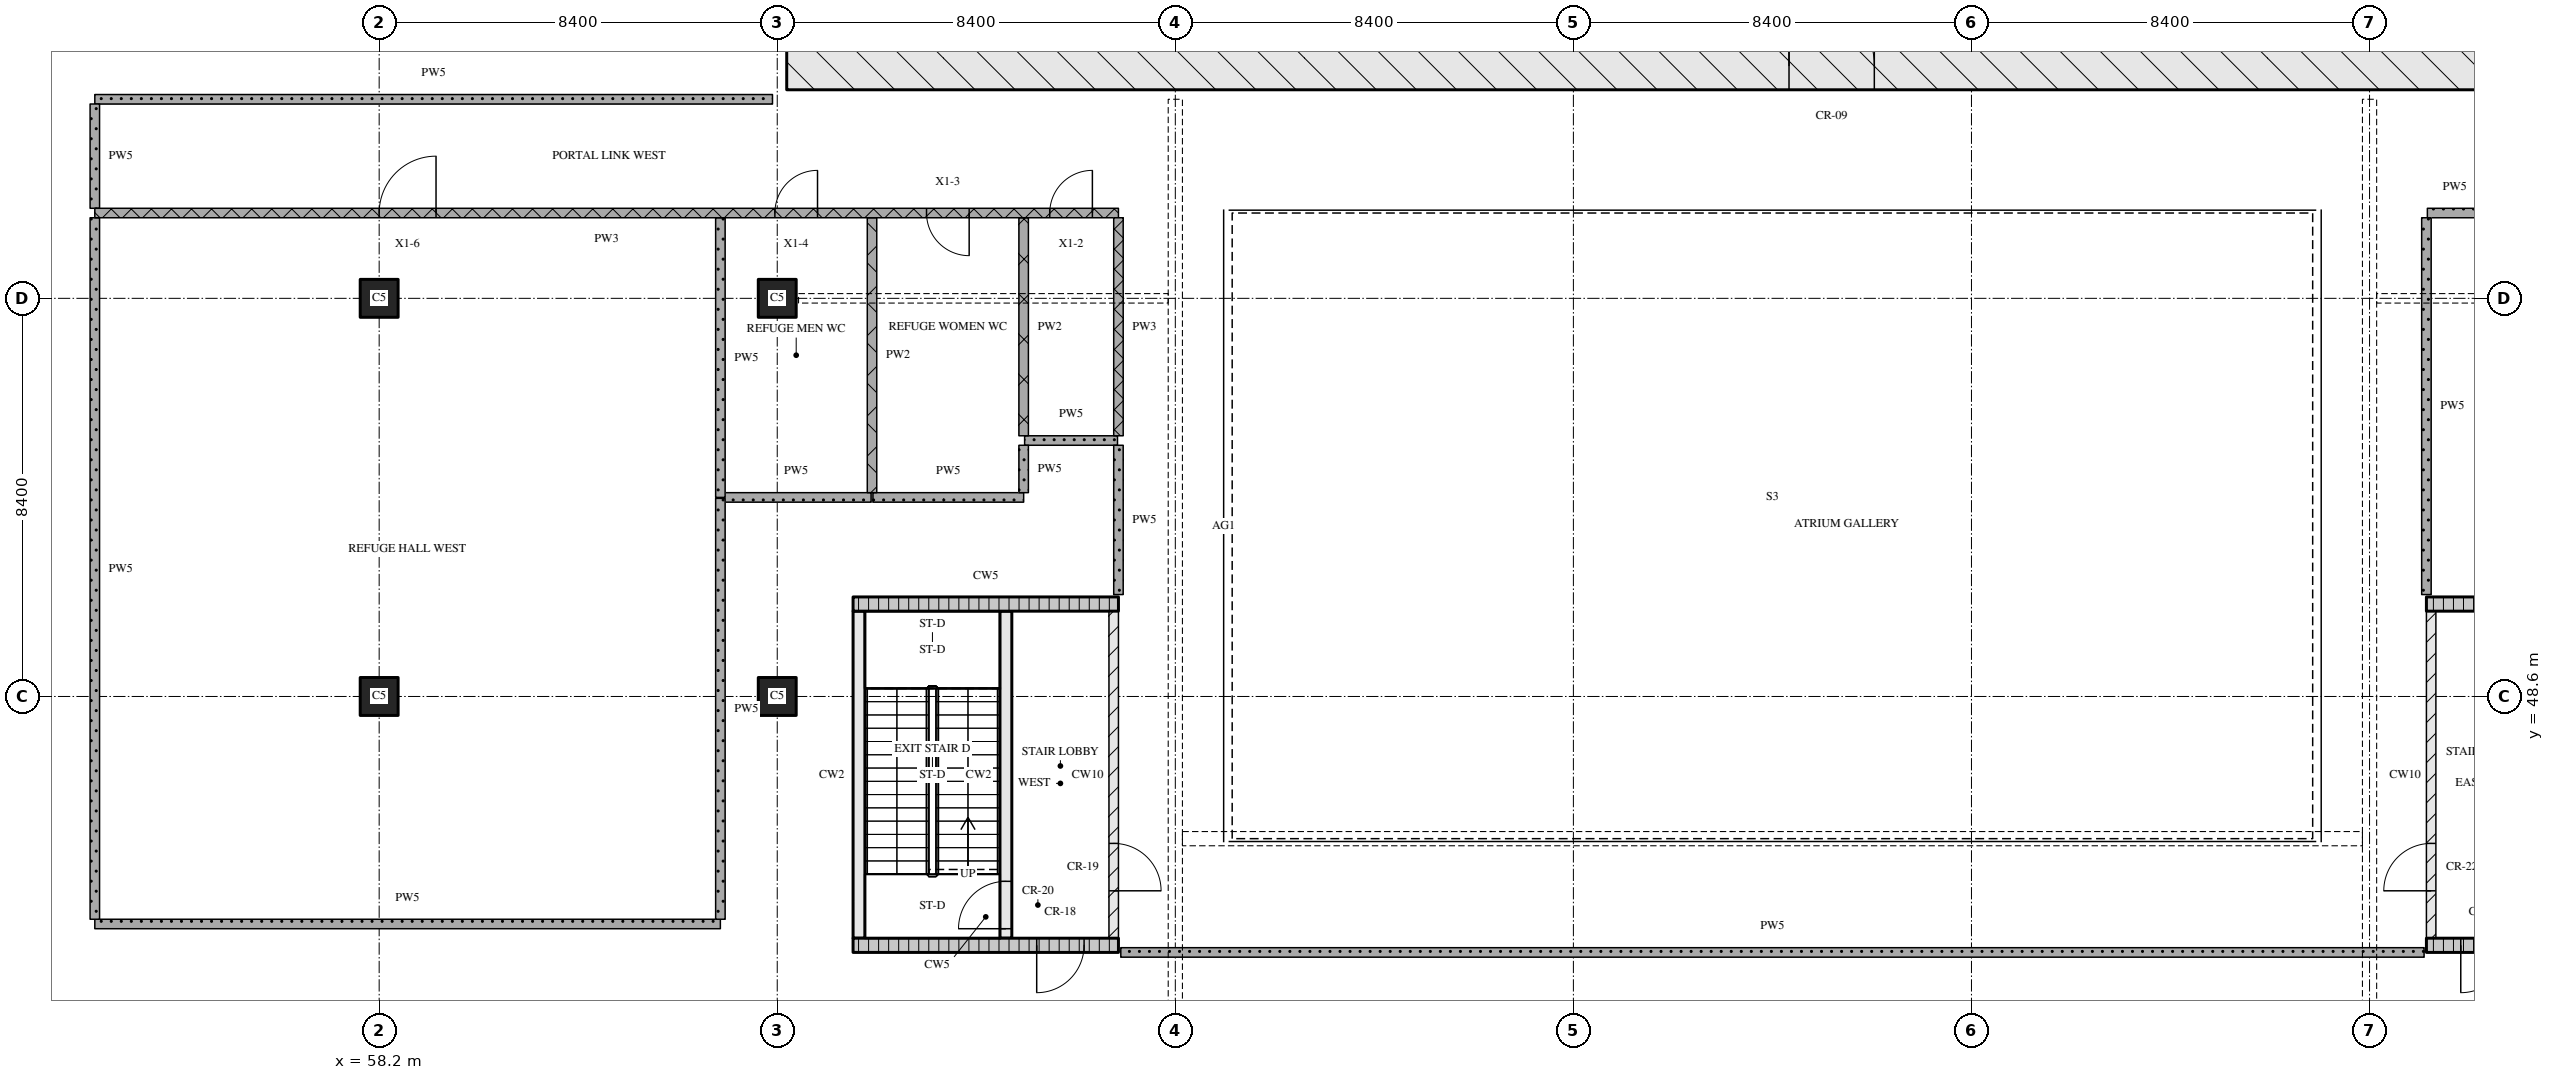
"""IFC4 building model, lengths in metres.
Left out: names, types, materials, properties, quantities, classifications, styles, units other than length and angle.
Written with IfcOpenShell. Run it as: python <this file> out.ifc"""

import sys

from ifc_helpers import new_model, si_unit, direction, frame, frame_2d, origin, origin_2d, place, context, subcontext, project, spatial, rectangle, extrude, element, fill, save


model = new_model("IFC4")
c1 = context("Model", 3, precision=1e-05, world=origin(), true_north=direction((0.0, 1.0)))
c2 = subcontext(c1, "Body", "Model", "MODEL_VIEW")
j1 = project(units=[si_unit("LENGTHUNIT", "METRE"), si_unit("PLANEANGLEUNIT", "RADIAN")], contexts=[c1])
p1 = place(None, origin())
s1 = spatial("IfcSite", under=j1, at=p1, CompositionType="ELEMENT")
p2 = place(p1, origin())
s2 = spatial("IfcBuilding", under=s1, at=p2, CompositionType="ELEMENT")
p3 = place(p2, frame((0.0, 0.0, 84.0)))
s3 = spatial("IfcBuildingStorey", under=s2, at=p3, CompositionType="ELEMENT", Elevation=84.0)
for number, where, z_axis, x_axis in (
    (1, (58.2, 48.6, 0.0), (0.0, 0.0, 1.0), (1.0, 0.0, 0.0)),
    (2, (58.2, 57.0, 0.0), (0.0, 0.0, 1.0), (1.0, 0.0, 0.0)),
    (3, (66.6, 48.6, 0.0), (0.0, 0.0, 1.0), (1.0, 0.0, 0.0)),
    (4, (66.6, 57.0, 0.0), (0.0, 0.0, 1.0), (1.0, 0.0, 0.0)),
):
    element("IfcColumn", number, at=place(p3, frame(where, z_axis=z_axis, x_axis=x_axis)), inside=s3, PredefinedType="COLUMN", context=c2, shape_type="SweptSolid", body=[
        extrude(rectangle(XDim=0.8, YDim=0.8, at=origin_2d()), origin(), (0.0, 0.0, 1.0), 11.25),
    ])
p4 = place(p3, frame((66.8, 61.9, 0.0), z_axis=(0.0, 0.0, 1.0), x_axis=(1.0, 0.0, 0.0)))
e5 = element("IfcWall", 5, at=p4, inside=s3, PredefinedType="SOLIDWALL", context=c2, shape_type="SweptSolid", body=[
    extrude(rectangle(XDim=41.6, YDim=1.0, at=frame_2d((20.8, 0.0))), origin(), (0.0, 0.0, 1.0), 10.97),
])
p5 = place(p4, frame((21.15, 0.0, 0.0)))
e6 = element("IfcOpeningElement", 6, at=p5, cuts=e5, PredefinedType="OPENING", context=c2, shape_type="SweptSolid", body=[
    extrude(rectangle(XDim=1.8, YDim=2.1, at=frame_2d((0.9, 1.05))), frame((0.0, 0.51, 0.0), z_axis=(0.0, -1.0, 0.0), x_axis=(1.0, 0.0, 0.0)), (0.0, 0.0, 1.0), 1.02),
])
p6 = place(p3, frame((68.2, 43.35, 0.0), z_axis=(0.0, 0.0, 1.0), x_axis=(1.0, 0.0, 0.0)))
e7 = element("IfcWall", 7, at=p6, inside=s3, PredefinedType="SOLIDWALL", context=c2, shape_type="SweptSolid", body=[
    extrude(rectangle(XDim=5.6, YDim=0.3, at=frame_2d((2.8, 0.0))), origin(), (0.0, 0.0, 1.0), 10.97),
])
p7 = place(p6, frame((3.875, 0.0, 0.0)))
e8 = element("IfcOpeningElement", 8, at=p7, cuts=e7, PredefinedType="OPENING", context=c2, shape_type="SweptSolid", body=[
    extrude(rectangle(XDim=1.0, YDim=2.1, at=frame_2d((0.5, 1.05))), frame((0.0, 0.16, 0.0), z_axis=(0.0, -1.0, 0.0), x_axis=(1.0, 0.0, 0.0)), (0.0, 0.0, 1.0), 0.32),
])
p8 = place(p3, frame((68.325, 43.5, 0.0), z_axis=(0.0, 0.0, 1.0), x_axis=(0.0, 1.0, 0.0)))
e9 = element("IfcWall", 9, at=p8, inside=s3, PredefinedType="SOLIDWALL", context=c2, shape_type="SweptSolid", body=[
    extrude(rectangle(XDim=6.9, YDim=0.25, at=frame_2d((3.45, 0.0))), origin(), (0.0, 0.0, 1.0), 10.97),
])
p9 = place(p3, frame((71.425, 43.5, 0.0), z_axis=(0.0, 0.0, 1.0), x_axis=(0.0, 1.0, 0.0)))
e10 = element("IfcWall", 10, at=p9, inside=s3, PredefinedType="SOLIDWALL", context=c2, shape_type="SweptSolid", body=[
    extrude(rectangle(XDim=6.9, YDim=0.25, at=frame_2d((3.45, 0.0))), origin(), (0.0, 0.0, 1.0), 10.97),
])
p10 = place(p9, frame((0.2, 0.0, 0.0)))
e11 = element("IfcOpeningElement", 11, at=p10, cuts=e10, PredefinedType="OPENING", context=c2, shape_type="SweptSolid", body=[
    extrude(rectangle(XDim=1.0, YDim=2.1, at=frame_2d((0.5, 1.05))), frame((0.0, 0.135, 0.0), z_axis=(0.0, -1.0, 0.0), x_axis=(1.0, 0.0, 0.0)), (0.0, 0.0, 1.0), 0.27),
])
p11 = place(p3, frame((73.7, 43.5, 0.0), z_axis=(0.0, 0.0, 1.0), x_axis=(0.0, 1.0, 0.0)))
e12 = element("IfcWall", 12, at=p11, inside=s3, PredefinedType="PARTITIONING", context=c2, shape_type="SweptSolid", body=[
    extrude(rectangle(XDim=6.9, YDim=0.2, at=frame_2d((3.45, 0.0))), origin(), (0.0, 0.0, 1.0), 10.97),
])
p12 = place(p11, frame((1.0, 0.0, 0.0)))
e13 = element("IfcOpeningElement", 13, at=p12, cuts=e12, PredefinedType="OPENING", context=c2, shape_type="SweptSolid", body=[
    extrude(rectangle(XDim=1.0, YDim=2.1, at=frame_2d((0.5, 1.05))), frame((0.0, 0.11, 0.0), z_axis=(0.0, -1.0, 0.0), x_axis=(1.0, 0.0, 0.0)), (0.0, 0.0, 1.0), 0.22),
])
p13 = place(p3, frame((68.2, 50.55, 0.0), z_axis=(0.0, 0.0, 1.0), x_axis=(1.0, 0.0, 0.0)))
e14 = element("IfcWall", 14, at=p13, inside=s3, PredefinedType="SOLIDWALL", context=c2, shape_type="SweptSolid", body=[
    extrude(rectangle(XDim=5.6, YDim=0.3, at=frame_2d((2.8, 0.0))), origin(), (0.0, 0.0, 1.0), 10.97),
])
p14 = place(p3, frame((101.4, 43.35, 0.0), z_axis=(0.0, 0.0, 1.0), x_axis=(1.0, 0.0, 0.0)))
e15 = element("IfcWall", 15, at=p14, inside=s3, PredefinedType="SOLIDWALL", context=c2, shape_type="SweptSolid", body=[
    extrude(rectangle(XDim=5.6, YDim=0.3, at=frame_2d((2.8, 0.0))), origin(), (0.0, 0.0, 1.0), 10.97),
])
p15 = place(p14, frame((0.725, 0.0, 0.0)))
e16 = element("IfcOpeningElement", 16, at=p15, cuts=e15, PredefinedType="OPENING", context=c2, shape_type="SweptSolid", body=[
    extrude(rectangle(XDim=1.0, YDim=2.1, at=frame_2d((0.5, 1.05))), frame((0.0, 0.16, 0.0), z_axis=(0.0, -1.0, 0.0), x_axis=(1.0, 0.0, 0.0)), (0.0, 0.0, 1.0), 0.32),
])
p16 = place(p3, frame((101.5, 43.5, 0.0), z_axis=(0.0, 0.0, 1.0), x_axis=(0.0, 1.0, 0.0)))
e17 = element("IfcWall", 17, at=p16, inside=s3, PredefinedType="PARTITIONING", context=c2, shape_type="SweptSolid", body=[
    extrude(rectangle(XDim=6.9, YDim=0.2, at=frame_2d((3.45, 0.0))), origin(), (0.0, 0.0, 1.0), 10.97),
])
p17 = place(p16, frame((1.0, 0.0, 0.0)))
e18 = element("IfcOpeningElement", 18, at=p17, cuts=e17, PredefinedType="OPENING", context=c2, shape_type="SweptSolid", body=[
    extrude(rectangle(XDim=1.0, YDim=2.1, at=frame_2d((0.5, 1.05))), frame((0.0, 0.11, 0.0), z_axis=(0.0, -1.0, 0.0), x_axis=(1.0, 0.0, 0.0)), (0.0, 0.0, 1.0), 0.22),
])
p18 = place(p3, frame((101.4, 50.55, 0.0), z_axis=(0.0, 0.0, 1.0), x_axis=(1.0, 0.0, 0.0)))
e19 = element("IfcWall", 19, at=p18, inside=s3, PredefinedType="SOLIDWALL", context=c2, shape_type="SweptSolid", body=[
    extrude(rectangle(XDim=5.6, YDim=0.3, at=frame_2d((2.8, 0.0))), origin(), (0.0, 0.0, 1.0), 10.97),
])
p19 = place(p3, frame((73.85, 43.2, 0.0), z_axis=(0.0, 0.0, 1.0), x_axis=(1.0, 0.0, 0.0)))
e20 = element("IfcWall", 20, at=p19, inside=s3, PredefinedType="PARTITIONING", context=c2, shape_type="SweptSolid", body=[
    extrude(rectangle(XDim=27.5, YDim=0.2, at=frame_2d((13.75, 0.0))), origin(), (0.0, 0.0, 1.0), 10.97),
])
p20 = place(p3, frame((52.2, 43.8, 0.0), z_axis=(0.0, 0.0, 1.0), x_axis=(1.0, 0.0, 0.0)))
e21 = element("IfcWall", 21, at=p20, inside=s3, PredefinedType="PARTITIONING", context=c2, shape_type="SweptSolid", body=[
    extrude(rectangle(XDim=13.2, YDim=0.2, at=frame_2d((6.6, 0.0))), origin(), (0.0, 0.0, 1.0), 10.97),
])
p21 = place(p3, frame((65.42, 52.8, 0.0), z_axis=(0.0, 0.0, 1.0), x_axis=(1.0, 0.0, 0.0)))
e22 = element("IfcWall", 22, at=p21, inside=s3, PredefinedType="PARTITIONING", context=c2, shape_type="SweptSolid", body=[
    extrude(rectangle(XDim=3.16, YDim=0.2, at=frame_2d((1.58, 0.0))), origin(), (0.0, 0.0, 1.0), 10.97),
])
p22 = place(p3, frame((68.62, 52.8, 0.0), z_axis=(0.0, 0.0, 1.0), x_axis=(1.0, 0.0, 0.0)))
e23 = element("IfcWall", 23, at=p22, inside=s3, PredefinedType="PARTITIONING", context=c2, shape_type="SweptSolid", body=[
    extrude(rectangle(XDim=3.18, YDim=0.2, at=frame_2d((1.59, 0.0))), origin(), (0.0, 0.0, 1.0), 10.97),
])
p23 = place(p3, frame((71.82, 54.0, 0.0), z_axis=(0.0, 0.0, 1.0), x_axis=(1.0, 0.0, 0.0)))
e24 = element("IfcWall", 24, at=p23, inside=s3, PredefinedType="PARTITIONING", context=c2, shape_type="SweptSolid", body=[
    extrude(rectangle(XDim=1.96, YDim=0.2, at=frame_2d((0.98, 0.0))), origin(), (0.0, 0.0, 1.0), 10.97),
])
p24 = place(p3, frame((73.8, 58.8, 0.0), z_axis=(0.0, 0.0, 1.0), x_axis=(-1.0, 0.0, 0.0)))
e25 = element("IfcWall", 25, at=p24, inside=s3, PredefinedType="PARTITIONING", context=c2, shape_type="SweptSolid", body=[
    extrude(rectangle(XDim=21.6, YDim=0.2, at=frame_2d((10.8, 0.0))), origin(), (0.0, 0.0, 1.0), 10.97),
])
p25 = place(p24, frame((0.55, 0.0, 0.0)))
e26 = element("IfcOpeningElement", 26, at=p25, cuts=e25, PredefinedType="OPENING", context=c2, shape_type="SweptSolid", body=[
    extrude(rectangle(XDim=0.9, YDim=2.1, at=frame_2d((0.45, 1.05))), frame((0.0, 0.11, 0.0), z_axis=(0.0, -1.0, 0.0), x_axis=(1.0, 0.0, 0.0)), (0.0, 0.0, 1.0), 0.22),
])
p26 = place(p24, frame((3.15, 0.0, 0.0)))
e27 = element("IfcOpeningElement", 27, at=p26, cuts=e25, PredefinedType="OPENING", context=c2, shape_type="SweptSolid", body=[
    extrude(rectangle(XDim=0.9, YDim=2.1, at=frame_2d((0.45, 1.05))), frame((0.0, 0.11, 0.0), z_axis=(0.0, -1.0, 0.0), x_axis=(1.0, 0.0, 0.0)), (0.0, 0.0, 1.0), 0.22),
])
p27 = place(p24, frame((6.35, 0.0, 0.0)))
e28 = element("IfcOpeningElement", 28, at=p27, cuts=e25, PredefinedType="OPENING", context=c2, shape_type="SweptSolid", body=[
    extrude(rectangle(XDim=0.9, YDim=2.1, at=frame_2d((0.45, 1.05))), frame((0.0, 0.11, 0.0), z_axis=(0.0, -1.0, 0.0), x_axis=(1.0, 0.0, 0.0)), (0.0, 0.0, 1.0), 0.22),
])
p28 = place(p24, frame((14.4, 0.0, 0.0)))
e29 = element("IfcOpeningElement", 29, at=p28, cuts=e25, PredefinedType="OPENING", context=c2, shape_type="SweptSolid", body=[
    extrude(rectangle(XDim=1.2, YDim=2.1, at=frame_2d((0.6, 1.05))), frame((0.0, 0.11, 0.0), z_axis=(0.0, -1.0, 0.0), x_axis=(1.0, 0.0, 0.0)), (0.0, 0.0, 1.0), 0.22),
])
p29 = place(p3, frame((101.42, 58.8, 0.0), z_axis=(0.0, 0.0, 1.0), x_axis=(1.0, 0.0, 0.0)))
e30 = element("IfcWall", 30, at=p29, inside=s3, PredefinedType="PARTITIONING", context=c2, shape_type="SweptSolid", body=[
    extrude(rectangle(XDim=1.16, YDim=0.2, at=frame_2d((0.58, 0.0))), origin(), (0.0, 0.0, 1.0), 10.97),
])
p30 = place(p3, frame((52.2, 61.2, 0.0), z_axis=(0.0, 0.0, 1.0), x_axis=(1.0, 0.0, 0.0)))
e31 = element("IfcWall", 31, at=p30, inside=s3, PredefinedType="PARTITIONING", context=c2, shape_type="SweptSolid", body=[
    extrude(rectangle(XDim=14.3, YDim=0.2, at=frame_2d((7.15, 0.0))), origin(), (0.0, 0.0, 1.0), 10.97),
])
p31 = place(p3, frame((52.2, 58.7, 0.0), z_axis=(0.0, 0.0, 1.0), x_axis=(0.0, -1.0, 0.0)))
e32 = element("IfcWall", 32, at=p31, inside=s3, PredefinedType="PARTITIONING", context=c2, shape_type="SweptSolid", body=[
    extrude(rectangle(XDim=14.8, YDim=0.2, at=frame_2d((7.4, 0.0))), origin(), (0.0, 0.0, 1.0), 10.97),
])
p32 = place(p3, frame((52.2, 61.1, 0.0), z_axis=(0.0, 0.0, 1.0), x_axis=(0.0, -1.0, 0.0)))
e33 = element("IfcWall", 33, at=p32, inside=s3, PredefinedType="PARTITIONING", context=c2, shape_type="SweptSolid", body=[
    extrude(rectangle(XDim=2.2, YDim=0.2, at=frame_2d((1.1, 0.0))), origin(), (0.0, 0.0, 1.0), 10.97),
])
p33 = place(p3, frame((65.4, 52.78, 0.0), z_axis=(0.0, 0.0, 1.0), x_axis=(0.0, -1.0, 0.0)))
e34 = element("IfcWall", 34, at=p33, inside=s3, PredefinedType="PARTITIONING", context=c2, shape_type="SweptSolid", body=[
    extrude(rectangle(XDim=8.88, YDim=0.2, at=frame_2d((4.44, 0.0))), origin(), (0.0, 0.0, 1.0), 10.97),
])
p34 = place(p3, frame((65.4, 58.7, 0.0), z_axis=(0.0, 0.0, 1.0), x_axis=(0.0, -1.0, 0.0)))
e35 = element("IfcWall", 35, at=p34, inside=s3, PredefinedType="PARTITIONING", context=c2, shape_type="SweptSolid", body=[
    extrude(rectangle(XDim=5.9, YDim=0.2, at=frame_2d((2.95, 0.0))), origin(), (0.0, 0.0, 1.0), 10.97),
])
p35 = place(p3, frame((68.6, 58.7, 0.0), z_axis=(0.0, 0.0, 1.0), x_axis=(0.0, -1.0, 0.0)))
e36 = element("IfcWall", 36, at=p35, inside=s3, PredefinedType="PARTITIONING", context=c2, shape_type="SweptSolid", body=[
    extrude(rectangle(XDim=5.8, YDim=0.2, at=frame_2d((2.9, 0.0))), origin(), (0.0, 0.0, 1.0), 10.97),
])
p36 = place(p3, frame((71.8, 58.7, 0.0), z_axis=(0.0, 0.0, 1.0), x_axis=(0.0, -1.0, 0.0)))
e37 = element("IfcWall", 37, at=p36, inside=s3, PredefinedType="PARTITIONING", context=c2, shape_type="SweptSolid", body=[
    extrude(rectangle(XDim=4.6, YDim=0.2, at=frame_2d((2.3, 0.0))), origin(), (0.0, 0.0, 1.0), 10.97),
])
p37 = place(p3, frame((71.8, 53.9, 0.0), z_axis=(0.0, 0.0, 1.0), x_axis=(0.0, -1.0, 0.0)))
e38 = element("IfcWall", 38, at=p37, inside=s3, PredefinedType="PARTITIONING", context=c2, shape_type="SweptSolid", body=[
    extrude(rectangle(XDim=1.0, YDim=0.2, at=frame_2d((0.5, 0.0))), origin(), (0.0, 0.0, 1.0), 10.97),
])
p38 = place(p3, frame((73.8, 58.7, 0.0), z_axis=(0.0, 0.0, 1.0), x_axis=(0.0, -1.0, 0.0)))
e39 = element("IfcWall", 39, at=p38, inside=s3, PredefinedType="PARTITIONING", context=c2, shape_type="SweptSolid", body=[
    extrude(rectangle(XDim=4.6, YDim=0.2, at=frame_2d((2.3, 0.0))), origin(), (0.0, 0.0, 1.0), 10.97),
])
p39 = place(p3, frame((73.8, 53.9, 0.0), z_axis=(0.0, 0.0, 1.0), x_axis=(0.0, -1.0, 0.0)))
e40 = element("IfcWall", 40, at=p39, inside=s3, PredefinedType="PARTITIONING", context=c2, shape_type="SweptSolid", body=[
    extrude(rectangle(XDim=3.15, YDim=0.2, at=frame_2d((1.575, 0.0))), origin(), (0.0, 0.0, 1.0), 10.97),
])
p40 = place(p3, frame((101.4, 58.7, 0.0), z_axis=(0.0, 0.0, 1.0), x_axis=(0.0, -1.0, 0.0)))
e41 = element("IfcWall", 41, at=p40, inside=s3, PredefinedType="PARTITIONING", context=c2, shape_type="SweptSolid", body=[
    extrude(rectangle(XDim=7.95, YDim=0.2, at=frame_2d((3.975, 0.0))), origin(), (0.0, 0.0, 1.0), 10.97),
])
p41 = place(p5, origin())
e42 = element("IfcDoor", 42, at=p41, inside=s3, OperationType="DOUBLE_DOOR_SINGLE_SWING", PredefinedType="DOOR", context=c2, shape_type="SweptSolid", body=[
    extrude(rectangle(XDim=1.8, YDim=2.1, at=frame_2d((0.9, 1.05))), frame((0.0, 0.025, 0.0), z_axis=(0.0, -1.0, 0.0), x_axis=(1.0, 0.0, 0.0)), (0.0, 0.0, 1.0), 0.05),
])
fill(e6, e42)
p42 = place(p7, origin())
e43 = element("IfcDoor", 43, at=p42, inside=s3, OperationType="SINGLE_SWING_RIGHT", PredefinedType="DOOR", context=c2, shape_type="SweptSolid", body=[
    extrude(rectangle(XDim=1.0, YDim=2.1, at=frame_2d((0.5, 1.05))), frame((0.0, 0.025, 0.0), z_axis=(0.0, -1.0, 0.0), x_axis=(1.0, 0.0, 0.0)), (0.0, 0.0, 1.0), 0.05),
])
fill(e8, e43)
p43 = place(p10, origin())
e44 = element("IfcDoor", 44, at=p43, inside=s3, OperationType="SINGLE_SWING_LEFT", PredefinedType="DOOR", context=c2, shape_type="SweptSolid", body=[
    extrude(rectangle(XDim=1.0, YDim=2.1, at=frame_2d((0.5, 1.05))), frame((0.0, 0.025, 0.0), z_axis=(0.0, -1.0, 0.0), x_axis=(1.0, 0.0, 0.0)), (0.0, 0.0, 1.0), 0.05),
])
fill(e11, e44)
p44 = place(p12, origin())
e45 = element("IfcDoor", 45, at=p44, inside=s3, OperationType="SINGLE_SWING_RIGHT", PredefinedType="DOOR", context=c2, shape_type="SweptSolid", body=[
    extrude(rectangle(XDim=1.0, YDim=2.1, at=frame_2d((0.5, 1.05))), frame((0.0, 0.025, 0.0), z_axis=(0.0, -1.0, 0.0), x_axis=(1.0, 0.0, 0.0)), (0.0, 0.0, 1.0), 0.05),
])
fill(e13, e45)
p45 = place(p15, origin())
e46 = element("IfcDoor", 46, at=p45, inside=s3, OperationType="SINGLE_SWING_RIGHT", PredefinedType="DOOR", context=c2, shape_type="SweptSolid", body=[
    extrude(rectangle(XDim=1.0, YDim=2.1, at=frame_2d((0.5, 1.05))), frame((0.0, 0.025, 0.0), z_axis=(0.0, -1.0, 0.0), x_axis=(1.0, 0.0, 0.0)), (0.0, 0.0, 1.0), 0.05),
])
fill(e16, e46)
p46 = place(p17, origin())
e47 = element("IfcDoor", 47, at=p46, inside=s3, OperationType="SINGLE_SWING_LEFT", PredefinedType="DOOR", context=c2, shape_type="SweptSolid", body=[
    extrude(rectangle(XDim=1.0, YDim=2.1, at=frame_2d((0.5, 1.05))), frame((0.0, 0.025, 0.0), z_axis=(0.0, -1.0, 0.0), x_axis=(1.0, 0.0, 0.0)), (0.0, 0.0, 1.0), 0.05),
])
fill(e18, e47)
p47 = place(p25, origin())
e48 = element("IfcDoor", 48, at=p47, inside=s3, OperationType="SINGLE_SWING_RIGHT", PredefinedType="DOOR", context=c2, shape_type="SweptSolid", body=[
    extrude(rectangle(XDim=0.9, YDim=2.1, at=frame_2d((0.45, 1.05))), frame((0.0, 0.025, 0.0), z_axis=(0.0, -1.0, 0.0), x_axis=(1.0, 0.0, 0.0)), (0.0, 0.0, 1.0), 0.05),
])
fill(e26, e48)
p48 = place(p26, origin())
e49 = element("IfcDoor", 49, at=p48, inside=s3, OperationType="SINGLE_SWING_LEFT", PredefinedType="DOOR", context=c2, shape_type="SweptSolid", body=[
    extrude(rectangle(XDim=0.9, YDim=2.1, at=frame_2d((0.45, 1.05))), frame((0.0, 0.025, 0.0), z_axis=(0.0, -1.0, 0.0), x_axis=(1.0, 0.0, 0.0)), (0.0, 0.0, 1.0), 0.05),
])
fill(e27, e49)
p49 = place(p27, origin())
e50 = element("IfcDoor", 50, at=p49, inside=s3, OperationType="SINGLE_SWING_RIGHT", PredefinedType="DOOR", context=c2, shape_type="SweptSolid", body=[
    extrude(rectangle(XDim=0.9, YDim=2.1, at=frame_2d((0.45, 1.05))), frame((0.0, 0.025, 0.0), z_axis=(0.0, -1.0, 0.0), x_axis=(1.0, 0.0, 0.0)), (0.0, 0.0, 1.0), 0.05),
])
fill(e28, e50)
p50 = place(p28, origin())
e51 = element("IfcDoor", 51, at=p50, inside=s3, OperationType="SINGLE_SWING_RIGHT", PredefinedType="DOOR", context=c2, shape_type="SweptSolid", body=[
    extrude(rectangle(XDim=1.2, YDim=2.1, at=frame_2d((0.6, 1.05))), frame((0.0, 0.025, 0.0), z_axis=(0.0, -1.0, 0.0), x_axis=(1.0, 0.0, 0.0)), (0.0, 0.0, 1.0), 0.05),
])
fill(e29, e51)
save(model, sys.argv[1])
